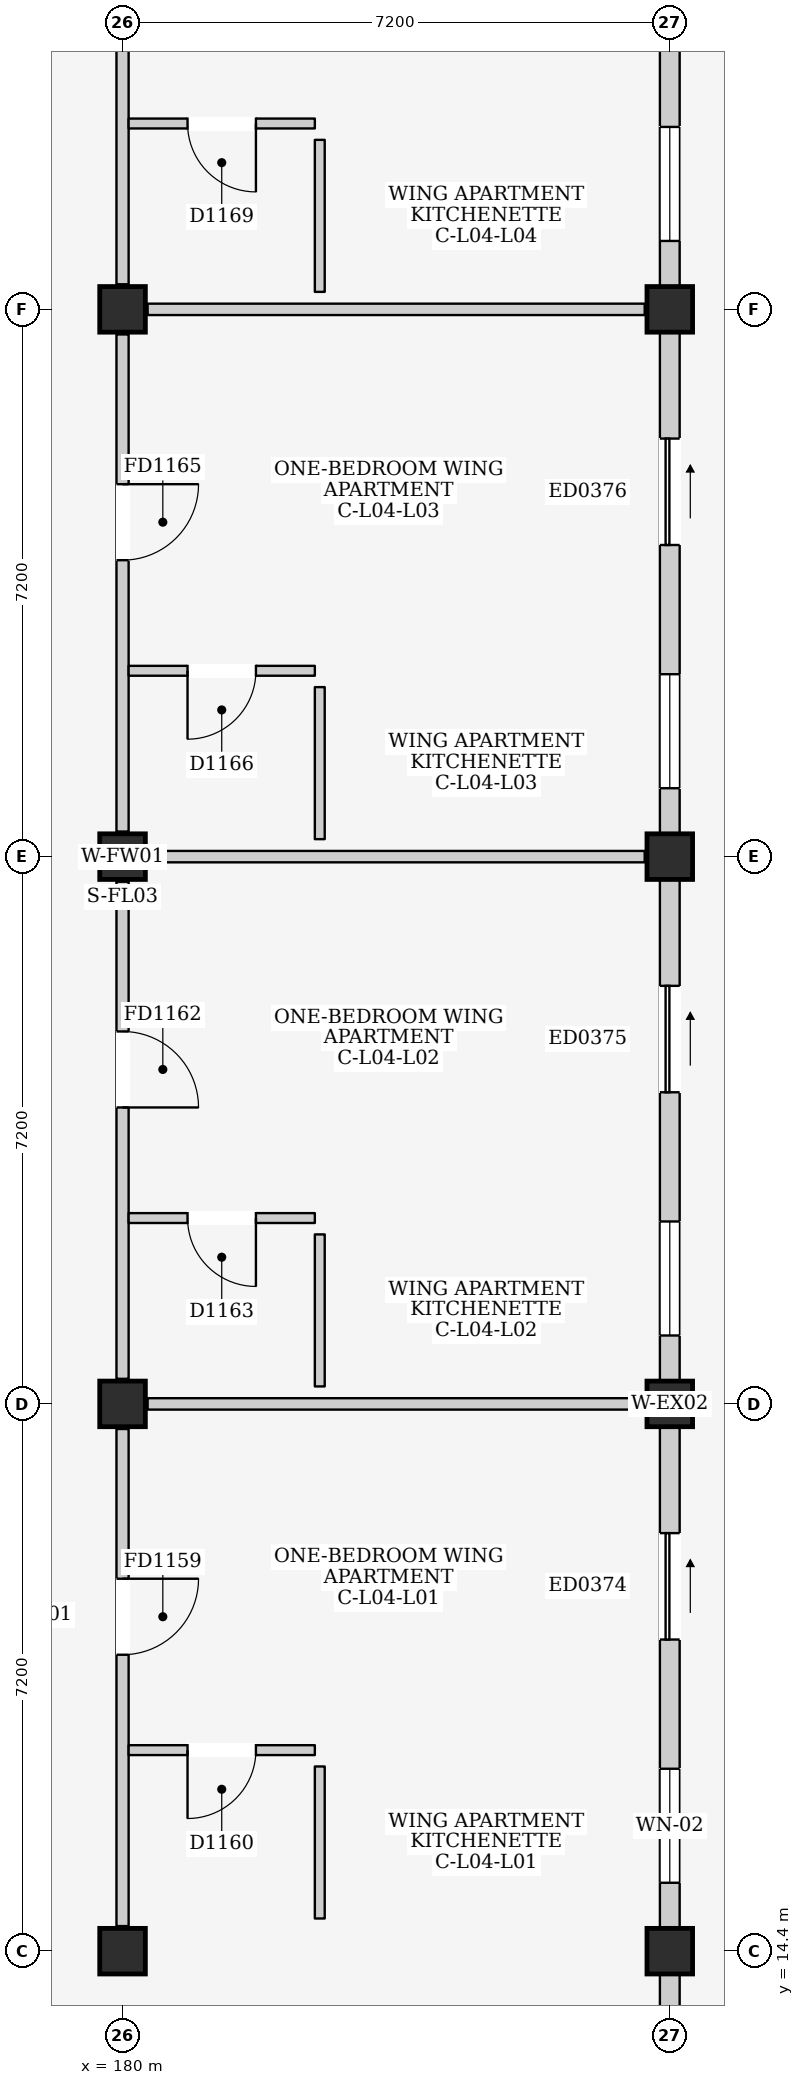
"""IFC4 building model, lengths in metres.
Left out: names, types, materials, properties, quantities, classifications, styles, units other than length and angle.
Written with IfcOpenShell. Run it as: python <this file> out.ifc"""

import sys

from ifc_helpers import new_model, si_unit, direction, frame, frame_2d, origin, origin_2d, place, context, subcontext, project, spatial, rectangle, extrude, element, fill, save


model = new_model("IFC4")
c1 = context("Model", 3, precision=1e-05, world=origin(), true_north=direction((0.0, 1.0)))
c2 = subcontext(c1, "Body", "Model", "MODEL_VIEW")
j1 = project(units=[si_unit("LENGTHUNIT", "METRE"), si_unit("PLANEANGLEUNIT", "RADIAN")], contexts=[c1])
p1 = place(None, origin())
s1 = spatial("IfcSite", under=j1, at=p1, CompositionType="ELEMENT")
p2 = place(p1, origin())
s2 = spatial("IfcBuilding", under=s1, at=p2, CompositionType="ELEMENT")
p3 = place(p2, frame((0.0, 0.0, 15.4)))
s3 = spatial("IfcBuildingStorey", under=s2, at=p3, CompositionType="ELEMENT", Elevation=15.4)
for number, where, z_axis, x_axis in (
    (1, (180.0, 14.4, 0.0), (0.0, 0.0, 1.0), (1.0, 0.0, 0.0)),
    (2, (180.0, 21.6, 0.0), (0.0, 0.0, 1.0), (1.0, 0.0, 0.0)),
    (3, (180.0, 28.8, 0.0), (0.0, 0.0, 1.0), (1.0, 0.0, 0.0)),
    (4, (180.0, 36.0, 0.0), (0.0, 0.0, 1.0), (1.0, 0.0, 0.0)),
    (5, (187.2, 14.4, 0.0), (0.0, 0.0, 1.0), (1.0, 0.0, 0.0)),
    (6, (187.2, 21.6, 0.0), (0.0, 0.0, 1.0), (1.0, 0.0, 0.0)),
    (7, (187.2, 28.8, 0.0), (0.0, 0.0, 1.0), (1.0, 0.0, 0.0)),
    (8, (187.2, 36.0, 0.0), (0.0, 0.0, 1.0), (1.0, 0.0, 0.0)),
):
    element("IfcColumn", number, at=place(p3, frame(where, z_axis=z_axis, x_axis=x_axis)), inside=s3, PredefinedType="COLUMN", context=c2, shape_type="SweptSolid", body=[
        extrude(rectangle(XDim=0.6, YDim=0.6, at=origin_2d()), origin(), (0.0, 0.0, 1.0), 3.2),
    ])
p4 = place(p3, frame((187.2, 7.5, 0.0), z_axis=(0.0, 0.0, 1.0), x_axis=(0.0, 1.0, 0.0)))
e9 = element("IfcWall", 9, at=p4, inside=s3, PredefinedType="ELEMENTEDWALL", context=c2, shape_type="SweptSolid", body=[
    extrude(rectangle(XDim=6.6, YDim=0.26, at=frame_2d((3.3, 0.0))), origin(), (0.0, 0.0, 1.0), 2.43),
])
p5 = place(p4, frame((3.65, 0.0, 0.0)))
e10 = element("IfcOpeningElement", 10, at=p5, cuts=e9, PredefinedType="OPENING", context=c2, shape_type="SweptSolid", body=[
    extrude(rectangle(XDim=1.4, YDim=2.1, at=frame_2d((0.7, 1.05))), frame((0.0, 0.145, 0.0), z_axis=(0.0, -1.0, 0.0), x_axis=(1.0, 0.0, 0.0)), (0.0, 0.0, 1.0), 0.29),
])
p6 = place(p3, frame((187.2, 14.7, 0.0), z_axis=(0.0, 0.0, 1.0), x_axis=(0.0, 1.0, 0.0)))
e11 = element("IfcWall", 11, at=p6, inside=s3, PredefinedType="ELEMENTEDWALL", context=c2, shape_type="SweptSolid", body=[
    extrude(rectangle(XDim=6.6, YDim=0.26, at=frame_2d((3.3, 0.0))), origin(), (0.0, 0.0, 1.0), 2.43),
])
p7 = place(p6, frame((3.8, 0.0, 0.0)))
e12 = element("IfcOpeningElement", 12, at=p7, cuts=e11, PredefinedType="OPENING", context=c2, shape_type="SweptSolid", body=[
    extrude(rectangle(XDim=1.4, YDim=2.1, at=frame_2d((0.7, 1.05))), frame((0.0, 0.145, 0.0), z_axis=(0.0, -1.0, 0.0), x_axis=(1.0, 0.0, 0.0)), (0.0, 0.0, 1.0), 0.29),
])
p8 = place(p6, frame((0.6, 0.0, 0.81)))
e13 = element("IfcOpeningElement", 13, at=p8, cuts=e11, PredefinedType="OPENING", context=c2, shape_type="SweptSolid", body=[
    extrude(rectangle(XDim=1.5, YDim=1.5, at=frame_2d((0.75, 0.75))), frame((0.0, 0.145, 0.0), z_axis=(0.0, -1.0, 0.0), x_axis=(1.0, 0.0, 0.0)), (0.0, 0.0, 1.0), 0.29),
])
p9 = place(p3, frame((187.2, 21.9, 0.0), z_axis=(0.0, 0.0, 1.0), x_axis=(0.0, 1.0, 0.0)))
e14 = element("IfcWall", 14, at=p9, inside=s3, PredefinedType="ELEMENTEDWALL", context=c2, shape_type="SweptSolid", body=[
    extrude(rectangle(XDim=6.6, YDim=0.26, at=frame_2d((3.3, 0.0))), origin(), (0.0, 0.0, 1.0), 2.43),
])
p10 = place(p9, frame((3.8, 0.0, 0.0)))
e15 = element("IfcOpeningElement", 15, at=p10, cuts=e14, PredefinedType="OPENING", context=c2, shape_type="SweptSolid", body=[
    extrude(rectangle(XDim=1.4, YDim=2.1, at=frame_2d((0.7, 1.05))), frame((0.0, 0.145, 0.0), z_axis=(0.0, -1.0, 0.0), x_axis=(1.0, 0.0, 0.0)), (0.0, 0.0, 1.0), 0.29),
])
p11 = place(p9, frame((0.6, 0.0, 0.81)))
e16 = element("IfcOpeningElement", 16, at=p11, cuts=e14, PredefinedType="OPENING", context=c2, shape_type="SweptSolid", body=[
    extrude(rectangle(XDim=1.5, YDim=1.5, at=frame_2d((0.75, 0.75))), frame((0.0, 0.145, 0.0), z_axis=(0.0, -1.0, 0.0), x_axis=(1.0, 0.0, 0.0)), (0.0, 0.0, 1.0), 0.29),
])
p12 = place(p3, frame((187.2, 29.1, 0.0), z_axis=(0.0, 0.0, 1.0), x_axis=(0.0, 1.0, 0.0)))
e17 = element("IfcWall", 17, at=p12, inside=s3, PredefinedType="ELEMENTEDWALL", context=c2, shape_type="SweptSolid", body=[
    extrude(rectangle(XDim=6.6, YDim=0.26, at=frame_2d((3.3, 0.0))), origin(), (0.0, 0.0, 1.0), 2.43),
])
p13 = place(p12, frame((3.8, 0.0, 0.0)))
e18 = element("IfcOpeningElement", 18, at=p13, cuts=e17, PredefinedType="OPENING", context=c2, shape_type="SweptSolid", body=[
    extrude(rectangle(XDim=1.4, YDim=2.1, at=frame_2d((0.7, 1.05))), frame((0.0, 0.145, 0.0), z_axis=(0.0, -1.0, 0.0), x_axis=(1.0, 0.0, 0.0)), (0.0, 0.0, 1.0), 0.29),
])
p14 = place(p12, frame((0.6, 0.0, 0.81)))
e19 = element("IfcOpeningElement", 19, at=p14, cuts=e17, PredefinedType="OPENING", context=c2, shape_type="SweptSolid", body=[
    extrude(rectangle(XDim=1.5, YDim=1.5, at=frame_2d((0.75, 0.75))), frame((0.0, 0.145, 0.0), z_axis=(0.0, -1.0, 0.0), x_axis=(1.0, 0.0, 0.0)), (0.0, 0.0, 1.0), 0.29),
])
p15 = place(p3, frame((187.2, 36.3, 0.0), z_axis=(0.0, 0.0, 1.0), x_axis=(0.0, 1.0, 0.0)))
e20 = element("IfcWall", 20, at=p15, inside=s3, PredefinedType="ELEMENTEDWALL", context=c2, shape_type="SweptSolid", body=[
    extrude(rectangle(XDim=6.6, YDim=0.26, at=frame_2d((3.3, 0.0))), origin(), (0.0, 0.0, 1.0), 2.43),
])
p16 = place(p15, frame((3.8, 0.0, 0.0)))
e21 = element("IfcOpeningElement", 21, at=p16, cuts=e20, PredefinedType="OPENING", context=c2, shape_type="SweptSolid", body=[
    extrude(rectangle(XDim=1.4, YDim=2.1, at=frame_2d((0.7, 1.05))), frame((0.0, 0.145, 0.0), z_axis=(0.0, -1.0, 0.0), x_axis=(1.0, 0.0, 0.0)), (0.0, 0.0, 1.0), 0.29),
])
p17 = place(p15, frame((0.6, 0.0, 0.81)))
e22 = element("IfcOpeningElement", 22, at=p17, cuts=e20, PredefinedType="OPENING", context=c2, shape_type="SweptSolid", body=[
    extrude(rectangle(XDim=1.5, YDim=1.5, at=frame_2d((0.75, 0.75))), frame((0.0, 0.145, 0.0), z_axis=(0.0, -1.0, 0.0), x_axis=(1.0, 0.0, 0.0)), (0.0, 0.0, 1.0), 0.29),
])
p18 = place(p3, frame((180.0, 14.73, 0.0), z_axis=(0.0, 0.0, 1.0), x_axis=(0.0, 1.0, 0.0)))
e23 = element("IfcWall", 23, at=p18, inside=s3, PredefinedType="PARTITIONING", context=c2, shape_type="SweptSolid", body=[
    extrude(rectangle(XDim=6.54, YDim=0.16, at=frame_2d((3.27, 0.0))), origin(), (0.0, 0.0, 1.0), 2.385),
])
p19 = place(p18, frame((3.57, 0.0, 0.0)))
e24 = element("IfcOpeningElement", 24, at=p19, cuts=e23, PredefinedType="OPENING", context=c2, shape_type="SweptSolid", body=[
    extrude(rectangle(XDim=1.0, YDim=2.15, at=frame_2d((0.5, 1.075))), frame((0.0, 0.095, 0.0), z_axis=(0.0, -1.0, 0.0), x_axis=(1.0, 0.0, 0.0)), (0.0, 0.0, 1.0), 0.19),
])
p20 = place(p3, frame((180.33, 21.6, 0.0), z_axis=(0.0, 0.0, 1.0), x_axis=(1.0, 0.0, 0.0)))
e25 = element("IfcWall", 25, at=p20, inside=s3, PredefinedType="PARTITIONING", context=c2, shape_type="SweptSolid", body=[
    extrude(rectangle(XDim=6.54, YDim=0.15, at=frame_2d((3.27, 0.0))), origin(), (0.0, 0.0, 1.0), 2.335),
])
p21 = place(p3, frame((180.08, 17.045, 0.0), z_axis=(0.0, 0.0, 1.0), x_axis=(1.0, 0.0, 0.0)))
e26 = element("IfcWall", 26, at=p21, inside=s3, PredefinedType="PARTITIONING", context=c2, shape_type="SweptSolid", body=[
    extrude(rectangle(XDim=2.45, YDim=0.13, at=frame_2d((1.225, 0.0))), origin(), (0.0, 0.0, 1.0), 2.95),
])
p22 = place(p21, frame((0.775, 0.0, 0.0)))
e27 = element("IfcOpeningElement", 27, at=p22, cuts=e26, PredefinedType="OPENING", context=c2, shape_type="SweptSolid", body=[
    extrude(rectangle(XDim=0.9, YDim=2.1, at=frame_2d((0.45, 1.05))), frame((0.0, 0.08, 0.0), z_axis=(0.0, -1.0, 0.0), x_axis=(1.0, 0.0, 0.0)), (0.0, 0.0, 1.0), 0.16),
])
p23 = place(p3, frame((182.595, 14.83, 0.0), z_axis=(0.0, 0.0, 1.0), x_axis=(0.0, 1.0, 0.0)))
e28 = element("IfcWall", 28, at=p23, inside=s3, PredefinedType="PARTITIONING", context=c2, shape_type="SweptSolid", body=[
    extrude(rectangle(XDim=2.0, YDim=0.13, at=frame_2d((1.0, 0.0))), origin(), (0.0, 0.0, 1.0), 2.95),
])
p24 = place(p3, frame((180.0, 21.93, 0.0), z_axis=(0.0, 0.0, 1.0), x_axis=(0.0, 1.0, 0.0)))
e29 = element("IfcWall", 29, at=p24, inside=s3, PredefinedType="PARTITIONING", context=c2, shape_type="SweptSolid", body=[
    extrude(rectangle(XDim=6.54, YDim=0.16, at=frame_2d((3.27, 0.0))), origin(), (0.0, 0.0, 1.0), 2.385),
])
p25 = place(p24, frame((3.57, 0.0, 0.0)))
e30 = element("IfcOpeningElement", 30, at=p25, cuts=e29, PredefinedType="OPENING", context=c2, shape_type="SweptSolid", body=[
    extrude(rectangle(XDim=1.0, YDim=2.15, at=frame_2d((0.5, 1.075))), frame((0.0, 0.095, 0.0), z_axis=(0.0, -1.0, 0.0), x_axis=(1.0, 0.0, 0.0)), (0.0, 0.0, 1.0), 0.19),
])
p26 = place(p3, frame((180.33, 28.8, 0.0), z_axis=(0.0, 0.0, 1.0), x_axis=(1.0, 0.0, 0.0)))
e31 = element("IfcWall", 31, at=p26, inside=s3, PredefinedType="PARTITIONING", context=c2, shape_type="SweptSolid", body=[
    extrude(rectangle(XDim=6.54, YDim=0.15, at=frame_2d((3.27, 0.0))), origin(), (0.0, 0.0, 1.0), 2.335),
])
p27 = place(p3, frame((180.08, 24.045, 0.0), z_axis=(0.0, 0.0, 1.0), x_axis=(1.0, 0.0, 0.0)))
e32 = element("IfcWall", 32, at=p27, inside=s3, PredefinedType="PARTITIONING", context=c2, shape_type="SweptSolid", body=[
    extrude(rectangle(XDim=2.45, YDim=0.13, at=frame_2d((1.225, 0.0))), origin(), (0.0, 0.0, 1.0), 2.95),
])
p28 = place(p27, frame((0.775, 0.0, 0.0)))
e33 = element("IfcOpeningElement", 33, at=p28, cuts=e32, PredefinedType="OPENING", context=c2, shape_type="SweptSolid", body=[
    extrude(rectangle(XDim=0.9, YDim=2.1, at=frame_2d((0.45, 1.05))), frame((0.0, 0.08, 0.0), z_axis=(0.0, -1.0, 0.0), x_axis=(1.0, 0.0, 0.0)), (0.0, 0.0, 1.0), 0.16),
])
p29 = place(p3, frame((182.595, 21.83, 0.0), z_axis=(0.0, 0.0, 1.0), x_axis=(0.0, 1.0, 0.0)))
e34 = element("IfcWall", 34, at=p29, inside=s3, PredefinedType="PARTITIONING", context=c2, shape_type="SweptSolid", body=[
    extrude(rectangle(XDim=2.0, YDim=0.13, at=frame_2d((1.0, 0.0))), origin(), (0.0, 0.0, 1.0), 2.95),
])
p30 = place(p3, frame((180.0, 29.13, 0.0), z_axis=(0.0, 0.0, 1.0), x_axis=(0.0, 1.0, 0.0)))
e35 = element("IfcWall", 35, at=p30, inside=s3, PredefinedType="PARTITIONING", context=c2, shape_type="SweptSolid", body=[
    extrude(rectangle(XDim=6.54, YDim=0.16, at=frame_2d((3.27, 0.0))), origin(), (0.0, 0.0, 1.0), 2.385),
])
p31 = place(p30, frame((3.57, 0.0, 0.0)))
e36 = element("IfcOpeningElement", 36, at=p31, cuts=e35, PredefinedType="OPENING", context=c2, shape_type="SweptSolid", body=[
    extrude(rectangle(XDim=1.0, YDim=2.15, at=frame_2d((0.5, 1.075))), frame((0.0, 0.095, 0.0), z_axis=(0.0, -1.0, 0.0), x_axis=(1.0, 0.0, 0.0)), (0.0, 0.0, 1.0), 0.19),
])
p32 = place(p3, frame((180.33, 36.0, 0.0), z_axis=(0.0, 0.0, 1.0), x_axis=(1.0, 0.0, 0.0)))
e37 = element("IfcWall", 37, at=p32, inside=s3, PredefinedType="PARTITIONING", context=c2, shape_type="SweptSolid", body=[
    extrude(rectangle(XDim=6.54, YDim=0.15, at=frame_2d((3.27, 0.0))), origin(), (0.0, 0.0, 1.0), 2.335),
])
p33 = place(p3, frame((180.08, 31.245, 0.0), z_axis=(0.0, 0.0, 1.0), x_axis=(1.0, 0.0, 0.0)))
e38 = element("IfcWall", 38, at=p33, inside=s3, PredefinedType="PARTITIONING", context=c2, shape_type="SweptSolid", body=[
    extrude(rectangle(XDim=2.45, YDim=0.13, at=frame_2d((1.225, 0.0))), origin(), (0.0, 0.0, 1.0), 2.95),
])
p34 = place(p33, frame((0.775, 0.0, 0.0)))
e39 = element("IfcOpeningElement", 39, at=p34, cuts=e38, PredefinedType="OPENING", context=c2, shape_type="SweptSolid", body=[
    extrude(rectangle(XDim=0.9, YDim=2.1, at=frame_2d((0.45, 1.05))), frame((0.0, 0.08, 0.0), z_axis=(0.0, -1.0, 0.0), x_axis=(1.0, 0.0, 0.0)), (0.0, 0.0, 1.0), 0.16),
])
p35 = place(p3, frame((182.595, 29.03, 0.0), z_axis=(0.0, 0.0, 1.0), x_axis=(0.0, 1.0, 0.0)))
e40 = element("IfcWall", 40, at=p35, inside=s3, PredefinedType="PARTITIONING", context=c2, shape_type="SweptSolid", body=[
    extrude(rectangle(XDim=2.0, YDim=0.13, at=frame_2d((1.0, 0.0))), origin(), (0.0, 0.0, 1.0), 2.95),
])
p36 = place(p3, frame((180.0, 36.33, 0.0), z_axis=(0.0, 0.0, 1.0), x_axis=(0.0, 1.0, 0.0)))
e41 = element("IfcWall", 41, at=p36, inside=s3, PredefinedType="PARTITIONING", context=c2, shape_type="SweptSolid", body=[
    extrude(rectangle(XDim=6.54, YDim=0.16, at=frame_2d((3.27, 0.0))), origin(), (0.0, 0.0, 1.0), 2.385),
])
p37 = place(p36, frame((3.57, 0.0, 0.0)))
e42 = element("IfcOpeningElement", 42, at=p37, cuts=e41, PredefinedType="OPENING", context=c2, shape_type="SweptSolid", body=[
    extrude(rectangle(XDim=1.0, YDim=2.15, at=frame_2d((0.5, 1.075))), frame((0.0, 0.095, 0.0), z_axis=(0.0, -1.0, 0.0), x_axis=(1.0, 0.0, 0.0)), (0.0, 0.0, 1.0), 0.19),
])
p38 = place(p3, frame((180.08, 38.445, 0.0), z_axis=(0.0, 0.0, 1.0), x_axis=(1.0, 0.0, 0.0)))
e43 = element("IfcWall", 43, at=p38, inside=s3, PredefinedType="PARTITIONING", context=c2, shape_type="SweptSolid", body=[
    extrude(rectangle(XDim=2.45, YDim=0.13, at=frame_2d((1.225, 0.0))), origin(), (0.0, 0.0, 1.0), 2.95),
])
p39 = place(p38, frame((0.775, 0.0, 0.0)))
e44 = element("IfcOpeningElement", 44, at=p39, cuts=e43, PredefinedType="OPENING", context=c2, shape_type="SweptSolid", body=[
    extrude(rectangle(XDim=0.9, YDim=2.1, at=frame_2d((0.45, 1.05))), frame((0.0, 0.08, 0.0), z_axis=(0.0, -1.0, 0.0), x_axis=(1.0, 0.0, 0.0)), (0.0, 0.0, 1.0), 0.16),
])
p40 = place(p3, frame((182.595, 36.23, 0.0), z_axis=(0.0, 0.0, 1.0), x_axis=(0.0, 1.0, 0.0)))
e45 = element("IfcWall", 45, at=p40, inside=s3, PredefinedType="PARTITIONING", context=c2, shape_type="SweptSolid", body=[
    extrude(rectangle(XDim=2.0, YDim=0.13, at=frame_2d((1.0, 0.0))), origin(), (0.0, 0.0, 1.0), 2.95),
])
p41 = place(p7, frame((1.4, 0.0, 0.0), z_axis=(0.0, 0.0, 1.0), x_axis=(-1.0, 0.0, 0.0)))
e46 = element("IfcDoor", 46, at=p41, inside=s3, OperationType="SLIDING_TO_RIGHT", PredefinedType="DOOR", context=c2, shape_type="SweptSolid", body=[
    extrude(rectangle(XDim=1.4, YDim=2.1, at=frame_2d((0.7, 1.05))), frame((0.0, 0.025, 0.0), z_axis=(0.0, -1.0, 0.0), x_axis=(1.0, 0.0, 0.0)), (0.0, 0.0, 1.0), 0.05),
])
fill(e12, e46)
p42 = place(p8, origin())
e47 = element("IfcWindow", 47, at=p42, inside=s3, PartitioningType="DOUBLE_PANEL_VERTICAL", PredefinedType="WINDOW", context=c2, shape_type="SweptSolid", body=[
    extrude(rectangle(XDim=1.5, YDim=1.5, at=frame_2d((0.75, 0.75))), frame((0.0, 0.03, 0.0), z_axis=(0.0, -1.0, 0.0), x_axis=(1.0, 0.0, 0.0)), (0.0, 0.0, 1.0), 0.06),
])
fill(e13, e47)
p43 = place(p10, frame((1.4, 0.0, 0.0), z_axis=(0.0, 0.0, 1.0), x_axis=(-1.0, 0.0, 0.0)))
e48 = element("IfcDoor", 48, at=p43, inside=s3, OperationType="SLIDING_TO_RIGHT", PredefinedType="DOOR", context=c2, shape_type="SweptSolid", body=[
    extrude(rectangle(XDim=1.4, YDim=2.1, at=frame_2d((0.7, 1.05))), frame((0.0, 0.025, 0.0), z_axis=(0.0, -1.0, 0.0), x_axis=(1.0, 0.0, 0.0)), (0.0, 0.0, 1.0), 0.05),
])
fill(e15, e48)
p44 = place(p11, origin())
e49 = element("IfcWindow", 49, at=p44, inside=s3, PartitioningType="DOUBLE_PANEL_VERTICAL", PredefinedType="WINDOW", context=c2, shape_type="SweptSolid", body=[
    extrude(rectangle(XDim=1.5, YDim=1.5, at=frame_2d((0.75, 0.75))), frame((0.0, 0.03, 0.0), z_axis=(0.0, -1.0, 0.0), x_axis=(1.0, 0.0, 0.0)), (0.0, 0.0, 1.0), 0.06),
])
fill(e16, e49)
p45 = place(p13, frame((1.4, 0.0, 0.0), z_axis=(0.0, 0.0, 1.0), x_axis=(-1.0, 0.0, 0.0)))
e50 = element("IfcDoor", 50, at=p45, inside=s3, OperationType="SLIDING_TO_RIGHT", PredefinedType="DOOR", context=c2, shape_type="SweptSolid", body=[
    extrude(rectangle(XDim=1.4, YDim=2.1, at=frame_2d((0.7, 1.05))), frame((0.0, 0.025, 0.0), z_axis=(0.0, -1.0, 0.0), x_axis=(1.0, 0.0, 0.0)), (0.0, 0.0, 1.0), 0.05),
])
fill(e18, e50)
p46 = place(p14, origin())
e51 = element("IfcWindow", 51, at=p46, inside=s3, PartitioningType="DOUBLE_PANEL_VERTICAL", PredefinedType="WINDOW", context=c2, shape_type="SweptSolid", body=[
    extrude(rectangle(XDim=1.5, YDim=1.5, at=frame_2d((0.75, 0.75))), frame((0.0, 0.03, 0.0), z_axis=(0.0, -1.0, 0.0), x_axis=(1.0, 0.0, 0.0)), (0.0, 0.0, 1.0), 0.06),
])
fill(e19, e51)
p47 = place(p17, origin())
e52 = element("IfcWindow", 52, at=p47, inside=s3, PartitioningType="DOUBLE_PANEL_VERTICAL", PredefinedType="WINDOW", context=c2, shape_type="SweptSolid", body=[
    extrude(rectangle(XDim=1.5, YDim=1.5, at=frame_2d((0.75, 0.75))), frame((0.0, 0.03, 0.0), z_axis=(0.0, -1.0, 0.0), x_axis=(1.0, 0.0, 0.0)), (0.0, 0.0, 1.0), 0.06),
])
fill(e22, e52)
p48 = place(p19, frame((1.0, 0.0, 0.0), z_axis=(0.0, 0.0, 1.0), x_axis=(-1.0, 0.0, 0.0)))
e53 = element("IfcDoor", 53, at=p48, inside=s3, OperationType="SINGLE_SWING_LEFT", PredefinedType="DOOR", context=c2, shape_type="SweptSolid", body=[
    extrude(rectangle(XDim=1.0, YDim=2.15, at=frame_2d((0.5, 1.075))), frame((0.0, 0.025, 0.0), z_axis=(0.0, -1.0, 0.0), x_axis=(1.0, 0.0, 0.0)), (0.0, 0.0, 1.0), 0.05),
])
fill(e24, e53)
p49 = place(p22, frame((0.9, 0.0, 0.0), z_axis=(0.0, 0.0, 1.0), x_axis=(-1.0, 0.0, 0.0)))
e54 = element("IfcDoor", 54, at=p49, inside=s3, OperationType="SINGLE_SWING_RIGHT", PredefinedType="DOOR", context=c2, shape_type="SweptSolid", body=[
    extrude(rectangle(XDim=0.9, YDim=2.1, at=frame_2d((0.45, 1.05))), frame((0.0, 0.025, 0.0), z_axis=(0.0, -1.0, 0.0), x_axis=(1.0, 0.0, 0.0)), (0.0, 0.0, 1.0), 0.05),
])
fill(e27, e54)
p50 = place(p25, frame((1.0, 0.0, 0.0), z_axis=(0.0, 0.0, 1.0), x_axis=(-1.0, 0.0, 0.0)))
e55 = element("IfcDoor", 55, at=p50, inside=s3, OperationType="SINGLE_SWING_RIGHT", PredefinedType="DOOR", context=c2, shape_type="SweptSolid", body=[
    extrude(rectangle(XDim=1.0, YDim=2.15, at=frame_2d((0.5, 1.075))), frame((0.0, 0.025, 0.0), z_axis=(0.0, -1.0, 0.0), x_axis=(1.0, 0.0, 0.0)), (0.0, 0.0, 1.0), 0.05),
])
fill(e30, e55)
p51 = place(p28, frame((0.9, 0.0, 0.0), z_axis=(0.0, 0.0, 1.0), x_axis=(-1.0, 0.0, 0.0)))
e56 = element("IfcDoor", 56, at=p51, inside=s3, OperationType="SINGLE_SWING_LEFT", PredefinedType="DOOR", context=c2, shape_type="SweptSolid", body=[
    extrude(rectangle(XDim=0.9, YDim=2.1, at=frame_2d((0.45, 1.05))), frame((0.0, 0.025, 0.0), z_axis=(0.0, -1.0, 0.0), x_axis=(1.0, 0.0, 0.0)), (0.0, 0.0, 1.0), 0.05),
])
fill(e33, e56)
p52 = place(p31, frame((1.0, 0.0, 0.0), z_axis=(0.0, 0.0, 1.0), x_axis=(-1.0, 0.0, 0.0)))
e57 = element("IfcDoor", 57, at=p52, inside=s3, OperationType="SINGLE_SWING_LEFT", PredefinedType="DOOR", context=c2, shape_type="SweptSolid", body=[
    extrude(rectangle(XDim=1.0, YDim=2.15, at=frame_2d((0.5, 1.075))), frame((0.0, 0.025, 0.0), z_axis=(0.0, -1.0, 0.0), x_axis=(1.0, 0.0, 0.0)), (0.0, 0.0, 1.0), 0.05),
])
fill(e36, e57)
p53 = place(p34, frame((0.9, 0.0, 0.0), z_axis=(0.0, 0.0, 1.0), x_axis=(-1.0, 0.0, 0.0)))
e58 = element("IfcDoor", 58, at=p53, inside=s3, OperationType="SINGLE_SWING_RIGHT", PredefinedType="DOOR", context=c2, shape_type="SweptSolid", body=[
    extrude(rectangle(XDim=0.9, YDim=2.1, at=frame_2d((0.45, 1.05))), frame((0.0, 0.025, 0.0), z_axis=(0.0, -1.0, 0.0), x_axis=(1.0, 0.0, 0.0)), (0.0, 0.0, 1.0), 0.05),
])
fill(e39, e58)
p54 = place(p39, frame((0.9, 0.0, 0.0), z_axis=(0.0, 0.0, 1.0), x_axis=(-1.0, 0.0, 0.0)))
e59 = element("IfcDoor", 59, at=p54, inside=s3, OperationType="SINGLE_SWING_LEFT", PredefinedType="DOOR", context=c2, shape_type="SweptSolid", body=[
    extrude(rectangle(XDim=0.9, YDim=2.1, at=frame_2d((0.45, 1.05))), frame((0.0, 0.025, 0.0), z_axis=(0.0, -1.0, 0.0), x_axis=(1.0, 0.0, 0.0)), (0.0, 0.0, 1.0), 0.05),
])
fill(e44, e59)
save(model, sys.argv[1])
